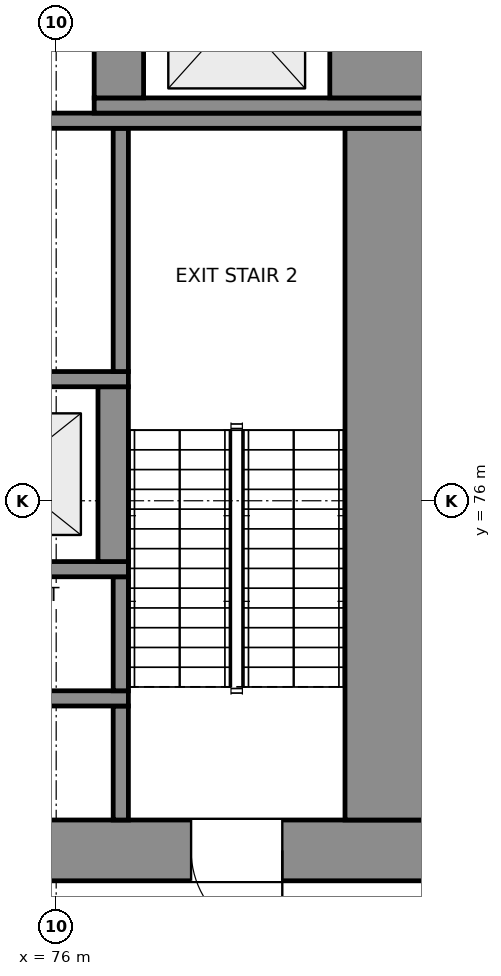
"""IFC4 building model, lengths in metres.
Left out: names, types, materials, properties, quantities, classifications, styles, units other than length and angle.
Written with IfcOpenShell. Run it as: python <this file> out.ifc"""

import sys

from ifc_helpers import new_model, si_unit, direction, frame, frame_2d, origin, place, context, subcontext, project, spatial, rectangle, extrude, element, fill, save


model = new_model("IFC4")
c1 = context("Model", 3, precision=1e-05, world=origin(), true_north=direction((0.0, 1.0)))
c2 = subcontext(c1, "Body", "Model", "MODEL_VIEW")
j1 = project(units=[si_unit("LENGTHUNIT", "METRE"), si_unit("PLANEANGLEUNIT", "RADIAN")], contexts=[c1])
p1 = place(None, origin())
s1 = spatial("IfcSite", under=j1, at=p1, CompositionType="ELEMENT")
p2 = place(p1, origin())
s2 = spatial("IfcBuilding", under=s1, at=p2, CompositionType="ELEMENT")
p3 = place(p2, frame((0.0, 0.0, 243.3)))
s3 = spatial("IfcBuildingStorey", under=s2, at=p3, CompositionType="ELEMENT", Elevation=243.3)
p4 = place(p3, frame((59.0, 71.4, 0.0), z_axis=(0.0, 0.0, 1.0), x_axis=(1.0, 0.0, 0.0)))
e1 = element("IfcWall", 1, at=p4, inside=s3, PredefinedType="SHEAR", context=c2, shape_type="SweptSolid", body=[
    extrude(rectangle(XDim=22.0, YDim=0.8, at=frame_2d((11.0, 0.0))), origin(), (0.0, 0.0, 1.0), 5.0),
])
p5 = place(p4, frame((2.025, 0.0, 0.0)))
e2 = element("IfcOpeningElement", 2, at=p5, cuts=e1, PredefinedType="OPENING", context=c2, shape_type="SweptSolid", body=[
    extrude(rectangle(XDim=1.2, YDim=2.1, at=frame_2d((0.6, 1.05))), frame((0.0, 0.41, 0.0), z_axis=(0.0, -1.0, 0.0), x_axis=(1.0, 0.0, 0.0)), (0.0, 0.0, 1.0), 0.82),
])
p6 = place(p4, frame((18.775, 0.0, 0.0)))
e3 = element("IfcOpeningElement", 3, at=p6, cuts=e1, PredefinedType="OPENING", context=c2, shape_type="SweptSolid", body=[
    extrude(rectangle(XDim=1.2, YDim=2.1, at=frame_2d((0.6, 1.05))), frame((0.0, 0.41, 0.0), z_axis=(0.0, -1.0, 0.0), x_axis=(1.0, 0.0, 0.0)), (0.0, 0.0, 1.0), 0.82),
])
p7 = place(p4, frame((10.0, 0.0, 0.0)))
e4 = element("IfcOpeningElement", 4, at=p7, cuts=e1, PredefinedType="OPENING", context=c2, shape_type="SweptSolid", body=[
    extrude(rectangle(XDim=2.0, YDim=2.1, at=frame_2d((1.0, 1.05))), frame((0.0, 0.41, 0.0), z_axis=(0.0, -1.0, 0.0), x_axis=(1.0, 0.0, 0.0)), (0.0, 0.0, 1.0), 0.82),
])
p8 = place(p3, frame((76.85, 71.8, 0.0), z_axis=(0.0, 0.0, 1.0), x_axis=(0.0, 1.0, 0.0)))
e5 = element("IfcWall", 5, at=p8, inside=s3, PredefinedType="SHEAR", context=c2, shape_type="SweptSolid", body=[
    extrude(rectangle(XDim=1.5, YDim=0.2, at=frame_2d((0.75, 0.0))), origin(), (0.0, 0.0, 1.0), 5.0),
])
p9 = place(p3, frame((80.4, 71.8, 0.0), z_axis=(0.0, 0.0, 1.0), x_axis=(0.0, 1.0, 0.0)))
e6 = element("IfcWall", 6, at=p9, inside=s3, PredefinedType="SHEAR", context=c2, shape_type="SweptSolid", body=[
    extrude(rectangle(XDim=9.1, YDim=1.2, at=frame_2d((4.55, 0.0))), origin(), (0.0, 0.0, 1.0), 5.0),
])
p10 = place(p3, frame((71.25, 73.4, 0.0), z_axis=(0.0, 0.0, 1.0), x_axis=(1.0, 0.0, 0.0)))
e7 = element("IfcWall", 7, at=p10, inside=s3, PredefinedType="SHEAR", context=c2, shape_type="SweptSolid", body=[
    extrude(rectangle(XDim=5.7, YDim=0.2, at=frame_2d((2.85, 0.0))), origin(), (0.0, 0.0, 1.0), 5.0),
])
p11 = place(p3, frame((76.85, 73.5, 0.0), z_axis=(0.0, 0.0, 1.0), x_axis=(0.0, 1.0, 0.0)))
e8 = element("IfcWall", 8, at=p11, inside=s3, PredefinedType="SHEAR", context=c2, shape_type="SweptSolid", body=[
    extrude(rectangle(XDim=1.5, YDim=0.2, at=frame_2d((0.75, 0.0))), origin(), (0.0, 0.0, 1.0), 5.0),
])
p12 = place(p3, frame((71.25, 75.1, 0.0), z_axis=(0.0, 0.0, 1.0), x_axis=(1.0, 0.0, 0.0)))
e9 = element("IfcWall", 9, at=p12, inside=s3, PredefinedType="SHEAR", context=c2, shape_type="SweptSolid", body=[
    extrude(rectangle(XDim=5.7, YDim=0.2, at=frame_2d((2.85, 0.0))), origin(), (0.0, 0.0, 1.0), 5.0),
])
p13 = place(p3, frame((76.75, 75.2, 0.0), z_axis=(0.0, 0.0, 1.0), x_axis=(0.0, 1.0, 0.0)))
e10 = element("IfcWall", 10, at=p13, inside=s3, PredefinedType="SHEAR", context=c2, shape_type="SweptSolid", body=[
    extrude(rectangle(XDim=2.3, YDim=0.4, at=frame_2d((1.15, 0.0))), origin(), (0.0, 0.0, 1.0), 5.0),
])
p14 = place(p3, frame((71.25, 77.6, 0.0), z_axis=(0.0, 0.0, 1.0), x_axis=(1.0, 0.0, 0.0)))
e11 = element("IfcWall", 11, at=p14, inside=s3, PredefinedType="SHEAR", context=c2, shape_type="SweptSolid", body=[
    extrude(rectangle(XDim=5.7, YDim=0.2, at=frame_2d((2.85, 0.0))), origin(), (0.0, 0.0, 1.0), 5.0),
])
p15 = place(p14, frame((0.875, 0.0, 0.0)))
e12 = element("IfcOpeningElement", 12, at=p15, cuts=e11, PredefinedType="OPENING", context=c2, shape_type="SweptSolid", body=[
    extrude(rectangle(XDim=1.1, YDim=2.1, at=frame_2d((0.55, 1.05))), frame((0.0, 0.11, 0.0), z_axis=(0.0, -1.0, 0.0), x_axis=(1.0, 0.0, 0.0)), (0.0, 0.0, 1.0), 0.22),
])
p16 = place(p14, frame((3.525, 0.0, 0.0)))
e13 = element("IfcOpeningElement", 13, at=p16, cuts=e11, PredefinedType="OPENING", context=c2, shape_type="SweptSolid", body=[
    extrude(rectangle(XDim=1.1, YDim=2.1, at=frame_2d((0.55, 1.05))), frame((0.0, 0.11, 0.0), z_axis=(0.0, -1.0, 0.0), x_axis=(1.0, 0.0, 0.0)), (0.0, 0.0, 1.0), 0.22),
])
p17 = place(p3, frame((76.85, 77.7, 0.0), z_axis=(0.0, 0.0, 1.0), x_axis=(0.0, 1.0, 0.0)))
e14 = element("IfcWall", 14, at=p17, inside=s3, PredefinedType="SHEAR", context=c2, shape_type="SweptSolid", body=[
    extrude(rectangle(XDim=3.2, YDim=0.2, at=frame_2d((1.6, 0.0))), origin(), (0.0, 0.0, 1.0), 5.0),
])
p18 = place(p3, frame((59.0, 81.0, 0.0), z_axis=(0.0, 0.0, 1.0), x_axis=(1.0, 0.0, 0.0)))
e15 = element("IfcWall", 15, at=p18, inside=s3, PredefinedType="SHEAR", context=c2, shape_type="SweptSolid", body=[
    extrude(rectangle(XDim=22.0, YDim=0.2, at=frame_2d((11.0, 0.0))), origin(), (0.0, 0.0, 1.0), 5.0),
])
p19 = place(p18, frame((11.015, 0.0, 0.0)))
e16 = element("IfcOpeningElement", 16, at=p19, cuts=e15, PredefinedType="OPENING", context=c2, shape_type="SweptSolid", body=[
    extrude(rectangle(XDim=0.9, YDim=2.1, at=frame_2d((0.45, 1.05))), frame((0.0, 0.11, 0.0), z_axis=(0.0, -1.0, 0.0), x_axis=(1.0, 0.0, 0.0)), (0.0, 0.0, 1.0), 0.22),
])
p20 = place(p18, frame((13.665, 0.0, 0.0)))
e17 = element("IfcOpeningElement", 17, at=p20, cuts=e15, PredefinedType="OPENING", context=c2, shape_type="SweptSolid", body=[
    extrude(rectangle(XDim=0.9, YDim=2.1, at=frame_2d((0.45, 1.05))), frame((0.0, 0.11, 0.0), z_axis=(0.0, -1.0, 0.0), x_axis=(1.0, 0.0, 0.0)), (0.0, 0.0, 1.0), 0.22),
])
p21 = place(p3, frame((76.5, 81.2, 0.0), z_axis=(0.0, 0.0, 1.0), x_axis=(1.0, 0.0, 0.0)))
e18 = element("IfcWall", 18, at=p21, inside=s3, PredefinedType="SHEAR", context=c2, shape_type="SweptSolid", body=[
    extrude(rectangle(XDim=4.5, YDim=0.2, at=frame_2d((2.25, 0.0))), origin(), (0.0, 0.0, 1.0), 5.0),
])
p22 = place(p3, frame((76.825, 81.3, 0.0), z_axis=(0.0, 0.0, 1.0), x_axis=(0.0, 1.0, 0.0)))
e19 = element("IfcWall", 19, at=p22, inside=s3, PredefinedType="SHEAR", context=c2, shape_type="SweptSolid", body=[
    extrude(rectangle(XDim=2.25, YDim=0.65, at=frame_2d((1.125, 0.0))), origin(), (0.0, 0.0, 1.0), 5.0),
])
p23 = place(p3, frame((80.3, 81.3, 0.0), z_axis=(0.0, 0.0, 1.0), x_axis=(0.0, 1.0, 0.0)))
e20 = element("IfcWall", 20, at=p23, inside=s3, PredefinedType="SHEAR", context=c2, shape_type="SweptSolid", body=[
    extrude(rectangle(XDim=2.25, YDim=1.4, at=frame_2d((1.125, 0.0))), origin(), (0.0, 0.0, 1.0), 5.0),
])
p24 = place(p6, frame((1.2, 0.0, 0.0), z_axis=(0.0, 0.0, 1.0), x_axis=(-1.0, 0.0, 0.0)))
e21 = element("IfcDoor", 21, at=p24, inside=s3, OperationType="SINGLE_SWING_LEFT", PredefinedType="DOOR", context=c2, shape_type="SweptSolid", body=[
    extrude(rectangle(XDim=1.2, YDim=2.1, at=frame_2d((0.6, 1.05))), frame((0.0, 0.025, 0.0), z_axis=(0.0, -1.0, 0.0), x_axis=(1.0, 0.0, 0.0)), (0.0, 0.0, 1.0), 0.05),
])
fill(e3, e21)
save(model, sys.argv[1])
